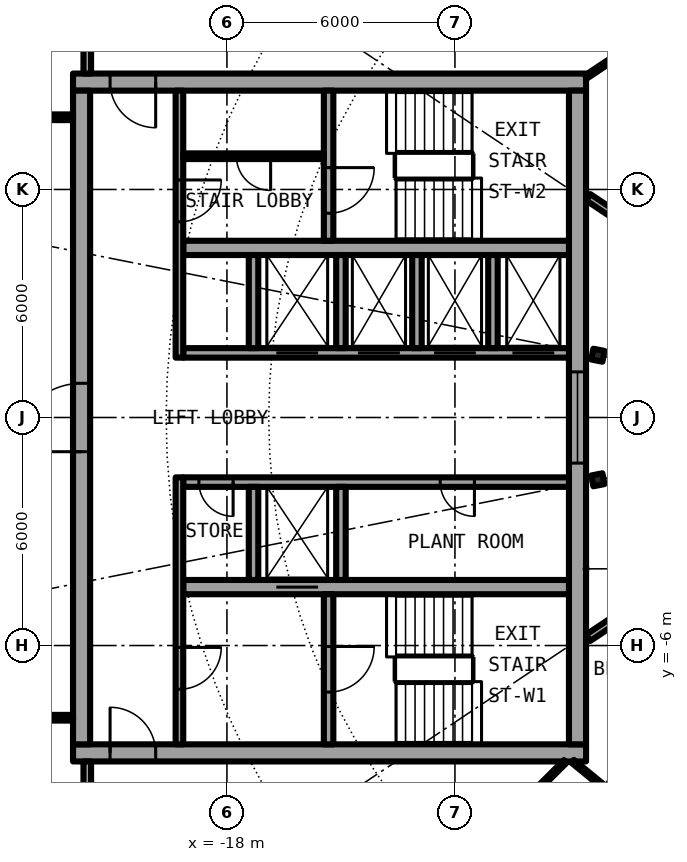
"""IFC4 building model, lengths in metres.
Left out: names, types, materials, properties, quantities, classifications, styles, units other than length and angle.
Written with IfcOpenShell. Run it as: python <this file> out.ifc"""

import sys

from ifc_helpers import new_model, si_unit, direction, frame, frame_2d, origin, origin_2d, place, context, subcontext, project, spatial, rectangle, i_section, extrude, element, fill, save


model = new_model("IFC4")
c1 = context("Model", 3, precision=1e-05, world=origin(), true_north=direction((0.0, 1.0)))
c2 = subcontext(c1, "Body", "Model", "MODEL_VIEW")
j1 = project(units=[si_unit("LENGTHUNIT", "METRE"), si_unit("PLANEANGLEUNIT", "RADIAN")], contexts=[c1])
p1 = place(None, origin())
s1 = spatial("IfcSite", under=j1, at=p1, CompositionType="ELEMENT")
p2 = place(p1, origin())
s2 = spatial("IfcBuilding", under=s1, at=p2, CompositionType="ELEMENT")
p3 = place(p2, frame((0.0, 0.0, 199.35)))
s3 = spatial("IfcBuildingStorey", under=s2, at=p3, CompositionType="ELEMENT", Elevation=199.35)
for number, where, z_axis, x_axis in (
    (1, (-8.239, 1.639, 0.0), (0.0, 0.0, 1.0), (-0.981, 0.195, 0.0)),
    (2, (-8.239, -1.639, 0.0), (0.0, 0.0, 1.0), (-0.981, -0.195, 0.0)),
):
    element("IfcColumn", number, at=place(p3, frame(where, z_axis=z_axis, x_axis=x_axis)), inside=s3, PredefinedType="COLUMN", context=c2, shape_type="SweptSolid", body=[
        extrude(i_section(OverallWidth=0.3, OverallDepth=0.29, WebThickness=0.009, FlangeThickness=0.014, FilletRadius=0.027, at=origin_2d()), origin(), (0.0, 0.0, 1.0), 3.05),
    ])
p4 = place(p3, frame((-22.05, -8.825, 0.0), z_axis=(0.0, 0.0, 1.0), x_axis=(1.0, 0.0, 0.0)))
e3 = element("IfcWall", 3, at=p4, inside=s3, PredefinedType="SHEAR", context=c2, shape_type="SweptSolid", body=[
    extrude(rectangle(XDim=13.5, YDim=0.45, at=frame_2d((6.75, 0.0))), origin(), (0.0, 0.0, 1.0), 3.05),
])
p5 = place(p4, frame((0.975, 0.0, 0.0)))
e4 = element("IfcOpeningElement", 4, at=p5, cuts=e3, PredefinedType="OPENING", context=c2, shape_type="SweptSolid", body=[
    extrude(rectangle(XDim=1.2, YDim=2.3, at=frame_2d((0.6, 1.15))), frame((0.0, 0.235, 0.0), z_axis=(0.0, -1.0, 0.0), x_axis=(1.0, 0.0, 0.0)), (0.0, 0.0, 1.0), 0.47),
])
p6 = place(p3, frame((-8.55, 8.825, 0.0), z_axis=(0.0, 0.0, 1.0), x_axis=(-1.0, 0.0, 0.0)))
e5 = element("IfcWall", 5, at=p6, inside=s3, PredefinedType="SHEAR", context=c2, shape_type="SweptSolid", body=[
    extrude(rectangle(XDim=13.5, YDim=0.45, at=frame_2d((6.75, 0.0))), origin(), (0.0, 0.0, 1.0), 3.05),
])
p7 = place(p6, frame((11.325, 0.0, 0.0)))
e6 = element("IfcOpeningElement", 6, at=p7, cuts=e5, PredefinedType="OPENING", context=c2, shape_type="SweptSolid", body=[
    extrude(rectangle(XDim=1.2, YDim=2.3, at=frame_2d((0.6, 1.15))), frame((0.0, 0.235, 0.0), z_axis=(0.0, -1.0, 0.0), x_axis=(1.0, 0.0, 0.0)), (0.0, 0.0, 1.0), 0.47),
])
p8 = place(p3, frame((-21.825, -8.6, 0.0), z_axis=(0.0, 0.0, 1.0), x_axis=(0.0, 1.0, 0.0)))
e7 = element("IfcWall", 7, at=p8, inside=s3, PredefinedType="SHEAR", context=c2, shape_type="SweptSolid", body=[
    extrude(rectangle(XDim=17.2, YDim=0.45, at=frame_2d((8.6, 0.0))), origin(), (0.0, 0.0, 1.0), 3.05),
])
p9 = place(p8, frame((7.7, 0.0, 0.0)))
e8 = element("IfcOpeningElement", 8, at=p9, cuts=e7, PredefinedType="OPENING", context=c2, shape_type="SweptSolid", body=[
    extrude(rectangle(XDim=1.8, YDim=2.3, at=frame_2d((0.9, 1.15))), frame((0.0, 0.235, 0.0), z_axis=(0.0, -1.0, 0.0), x_axis=(1.0, 0.0, 0.0)), (0.0, 0.0, 1.0), 0.47),
])
p10 = place(p3, frame((-8.775, 8.6, 0.0), z_axis=(0.0, 0.0, 1.0), x_axis=(0.0, -1.0, 0.0)))
e9 = element("IfcWall", 9, at=p10, inside=s3, PredefinedType="SHEAR", context=c2, shape_type="SweptSolid", body=[
    extrude(rectangle(XDim=17.2, YDim=0.45, at=frame_2d((8.6, 0.0))), origin(), (0.0, 0.0, 1.0), 3.05),
])
p11 = place(p10, frame((7.4, 0.0, 0.1)))
e10 = element("IfcOpeningElement", 10, at=p11, cuts=e9, PredefinedType="OPENING", context=c2, shape_type="SweptSolid", body=[
    extrude(rectangle(XDim=2.4, YDim=2.2, at=frame_2d((1.2, 1.1))), frame((0.0, 0.235, 0.0), z_axis=(0.0, -1.0, 0.0), x_axis=(1.0, 0.0, 0.0)), (0.0, 0.0, 1.0), 0.47),
])
p12 = place(p3, frame((-9.0, -1.7, 0.0), z_axis=(0.0, 0.0, 1.0), x_axis=(-1.0, 0.0, 0.0)))
e11 = element("IfcWall", 11, at=p12, inside=s3, PredefinedType="SHEAR", context=c2, shape_type="SweptSolid", body=[
    extrude(rectangle(XDim=10.15, YDim=0.25, at=frame_2d((5.075, 0.0))), origin(), (0.0, 0.0, 1.0), 3.05),
])
p13 = place(p12, frame((2.488, 0.0, 0.0)))
e12 = element("IfcOpeningElement", 12, at=p13, cuts=e11, PredefinedType="OPENING", context=c2, shape_type="SweptSolid", body=[
    extrude(rectangle(XDim=0.9, YDim=2.3, at=frame_2d((0.45, 1.15))), frame((0.0, 0.135, 0.0), z_axis=(0.0, -1.0, 0.0), x_axis=(1.0, 0.0, 0.0)), (0.0, 0.0, 1.0), 0.27),
])
p14 = place(p12, frame((8.837, 0.0, 0.0)))
e13 = element("IfcOpeningElement", 13, at=p14, cuts=e11, PredefinedType="OPENING", context=c2, shape_type="SweptSolid", body=[
    extrude(rectangle(XDim=0.9, YDim=2.3, at=frame_2d((0.45, 1.15))), frame((0.0, 0.135, 0.0), z_axis=(0.0, -1.0, 0.0), x_axis=(1.0, 0.0, 0.0)), (0.0, 0.0, 1.0), 0.27),
])
p15 = place(p3, frame((-9.0, -4.462, 0.0), z_axis=(0.0, 0.0, 1.0), x_axis=(-1.0, 0.0, 0.0)))
e14 = element("IfcWall", 14, at=p15, inside=s3, PredefinedType="SHEAR", context=c2, shape_type="SweptSolid", body=[
    extrude(rectangle(XDim=10.15, YDim=0.375, at=frame_2d((5.075, 0.0))), origin(), (0.0, 0.0, 1.0), 3.05),
])
p16 = place(p15, frame((6.6, 0.0, 0.0)))
e15 = element("IfcOpeningElement", 15, at=p16, cuts=e14, PredefinedType="OPENING", context=c2, shape_type="SweptSolid", body=[
    extrude(rectangle(XDim=1.1, YDim=2.3, at=frame_2d((0.55, 1.15))), frame((0.0, 0.198, 0.0), z_axis=(0.0, -1.0, 0.0), x_axis=(1.0, 0.0, 0.0)), (0.0, 0.0, 1.0), 0.395),
])
p17 = place(p3, frame((-15.325, -4.65, 0.0), z_axis=(0.0, 0.0, 1.0), x_axis=(0.0, -1.0, 0.0)))
e16 = element("IfcWall", 16, at=p17, inside=s3, PredefinedType="SHEAR", context=c2, shape_type="SweptSolid", body=[
    extrude(rectangle(XDim=3.95, YDim=0.25, at=frame_2d((1.975, 0.0))), origin(), (0.0, 0.0, 1.0), 3.05),
])
p18 = place(p17, frame((1.375, 0.0, 0.0)))
e17 = element("IfcOpeningElement", 17, at=p18, cuts=e16, PredefinedType="OPENING", context=c2, shape_type="SweptSolid", body=[
    extrude(rectangle(XDim=1.2, YDim=2.3, at=frame_2d((0.6, 1.15))), frame((0.0, 0.135, 0.0), z_axis=(0.0, -1.0, 0.0), x_axis=(1.0, 0.0, 0.0)), (0.0, 0.0, 1.0), 0.27),
])
for number, where, z_axis, x_axis in (
    (18, (-15.0, -1.825, 0.0), (0.0, 0.0, 1.0), (0.0, -1.0, 0.0)),
    (19, (-17.3, -1.825, 0.0), (0.0, 0.0, 1.0), (0.0, -1.0, 0.0)),
):
    element("IfcWall", number, at=place(p3, frame(where, z_axis=z_axis, x_axis=x_axis)), inside=s3, PredefinedType="SOLIDWALL", context=c2, shape_type="SweptSolid", body=[
        extrude(rectangle(XDim=2.45, YDim=0.25, at=frame_2d((1.225, 0.0))), origin(), (0.0, 0.0, 1.0), 2.7),
    ])
p19 = place(p3, frame((-19.25, -1.575, 0.0), z_axis=(0.0, 0.0, 1.0), x_axis=(0.0, -1.0, 0.0)))
e20 = element("IfcWall", 20, at=p19, inside=s3, PredefinedType="SOLIDWALL", context=c2, shape_type="SweptSolid", body=[
    extrude(rectangle(XDim=7.025, YDim=0.2, at=frame_2d((3.513, 0.0))), origin(), (0.0, 0.0, 1.0), 2.7),
])
p20 = place(p19, frame((4.475, 0.0, 0.0)))
e21 = element("IfcOpeningElement", 21, at=p20, cuts=e20, PredefinedType="OPENING", context=c2, shape_type="SweptSolid", body=[
    extrude(rectangle(XDim=1.1, YDim=2.3, at=frame_2d((0.55, 1.15))), frame((0.0, 0.11, 0.0), z_axis=(0.0, -1.0, 0.0), x_axis=(1.0, 0.0, 0.0)), (0.0, 0.0, 1.0), 0.22),
])
p21 = place(p3, frame((-9.0, 1.7, 0.0), z_axis=(0.0, 0.0, 1.0), x_axis=(-1.0, 0.0, 0.0)))
e22 = element("IfcWall", 22, at=p21, inside=s3, PredefinedType="SHEAR", context=c2, shape_type="SweptSolid", body=[
    extrude(rectangle(XDim=10.15, YDim=0.25, at=frame_2d((5.075, 0.0))), origin(), (0.0, 0.0, 1.0), 3.05),
])
p22 = place(p21, frame((0.387, 0.0, 0.0)))
e23 = element("IfcOpeningElement", 23, at=p22, cuts=e22, PredefinedType="OPENING", context=c2, shape_type="SweptSolid", body=[
    extrude(rectangle(XDim=1.1, YDim=2.3, at=frame_2d((0.55, 1.15))), frame((0.0, 0.135, 0.0), z_axis=(0.0, -1.0, 0.0), x_axis=(1.0, 0.0, 0.0)), (0.0, 0.0, 1.0), 0.27),
])
p23 = place(p21, frame((2.45, 0.0, 0.0)))
e24 = element("IfcOpeningElement", 24, at=p23, cuts=e22, PredefinedType="OPENING", context=c2, shape_type="SweptSolid", body=[
    extrude(rectangle(XDim=1.1, YDim=2.3, at=frame_2d((0.55, 1.15))), frame((0.0, 0.135, 0.0), z_axis=(0.0, -1.0, 0.0), x_axis=(1.0, 0.0, 0.0)), (0.0, 0.0, 1.0), 0.27),
])
p24 = place(p21, frame((4.45, 0.0, 0.0)))
e25 = element("IfcOpeningElement", 25, at=p24, cuts=e22, PredefinedType="OPENING", context=c2, shape_type="SweptSolid", body=[
    extrude(rectangle(XDim=1.1, YDim=2.3, at=frame_2d((0.55, 1.15))), frame((0.0, 0.135, 0.0), z_axis=(0.0, -1.0, 0.0), x_axis=(1.0, 0.0, 0.0)), (0.0, 0.0, 1.0), 0.27),
])
p25 = place(p21, frame((6.6, 0.0, 0.0)))
e26 = element("IfcOpeningElement", 26, at=p25, cuts=e22, PredefinedType="OPENING", context=c2, shape_type="SweptSolid", body=[
    extrude(rectangle(XDim=1.1, YDim=2.3, at=frame_2d((0.55, 1.15))), frame((0.0, 0.135, 0.0), z_axis=(0.0, -1.0, 0.0), x_axis=(1.0, 0.0, 0.0)), (0.0, 0.0, 1.0), 0.27),
])
p26 = place(p3, frame((-9.0, 4.462, 0.0), z_axis=(0.0, 0.0, 1.0), x_axis=(-1.0, 0.0, 0.0)))
e27 = element("IfcWall", 27, at=p26, inside=s3, PredefinedType="SHEAR", context=c2, shape_type="SweptSolid", body=[
    extrude(rectangle(XDim=10.15, YDim=0.375, at=frame_2d((5.075, 0.0))), origin(), (0.0, 0.0, 1.0), 3.05),
])
p27 = place(p3, frame((-15.325, 8.6, 0.0), z_axis=(0.0, 0.0, 1.0), x_axis=(0.0, -1.0, 0.0)))
e28 = element("IfcWall", 28, at=p27, inside=s3, PredefinedType="SHEAR", context=c2, shape_type="SweptSolid", body=[
    extrude(rectangle(XDim=3.95, YDim=0.25, at=frame_2d((1.975, 0.0))), origin(), (0.0, 0.0, 1.0), 3.05),
])
p28 = place(p27, frame((2.025, 0.0, 0.0)))
e29 = element("IfcOpeningElement", 29, at=p28, cuts=e28, PredefinedType="OPENING", context=c2, shape_type="SweptSolid", body=[
    extrude(rectangle(XDim=1.2, YDim=2.3, at=frame_2d((0.6, 1.15))), frame((0.0, 0.135, 0.0), z_axis=(0.0, -1.0, 0.0), x_axis=(1.0, 0.0, 0.0)), (0.0, 0.0, 1.0), 0.27),
])
for number, where, z_axis, x_axis in (
    (30, (-15.0, 1.825, 0.0), (0.0, 0.0, 1.0), (0.0, 1.0, 0.0)),
    (31, (-17.3, 1.825, 0.0), (0.0, 0.0, 1.0), (0.0, 1.0, 0.0)),
):
    element("IfcWall", number, at=place(p3, frame(where, z_axis=z_axis, x_axis=x_axis)), inside=s3, PredefinedType="SOLIDWALL", context=c2, shape_type="SweptSolid", body=[
        extrude(rectangle(XDim=2.45, YDim=0.25, at=frame_2d((1.225, 0.0))), origin(), (0.0, 0.0, 1.0), 2.7),
    ])
p29 = place(p3, frame((-19.25, 8.6, 0.0), z_axis=(0.0, 0.0, 1.0), x_axis=(0.0, -1.0, 0.0)))
e32 = element("IfcWall", 32, at=p29, inside=s3, PredefinedType="SOLIDWALL", context=c2, shape_type="SweptSolid", body=[
    extrude(rectangle(XDim=7.025, YDim=0.2, at=frame_2d((3.513, 0.0))), origin(), (0.0, 0.0, 1.0), 2.7),
])
p30 = place(p29, frame((2.35, 0.0, 0.0)))
e33 = element("IfcOpeningElement", 33, at=p30, cuts=e32, PredefinedType="OPENING", context=c2, shape_type="SweptSolid", body=[
    extrude(rectangle(XDim=1.1, YDim=2.3, at=frame_2d((0.55, 1.15))), frame((0.0, 0.11, 0.0), z_axis=(0.0, -1.0, 0.0), x_axis=(1.0, 0.0, 0.0)), (0.0, 0.0, 1.0), 0.22),
])
for number, where, z_axis, x_axis in (
    (34, (-11.0, 1.825, 0.0), (0.0, 0.0, 1.0), (0.0, 1.0, 0.0)),
    (35, (-13.0, 1.825, 0.0), (0.0, 0.0, 1.0), (0.0, 1.0, 0.0)),
):
    element("IfcWall", number, at=place(p3, frame(where, z_axis=z_axis, x_axis=x_axis)), inside=s3, PredefinedType="SOLIDWALL", context=c2, shape_type="SweptSolid", body=[
        extrude(rectangle(XDim=2.45, YDim=0.25, at=frame_2d((1.225, 0.0))), origin(), (0.0, 0.0, 1.0), 2.7),
    ])
p31 = place(p3, frame((-15.45, 6.875, 0.0), z_axis=(0.0, 0.0, 1.0), x_axis=(-1.0, 0.0, 0.0)))
e36 = element("IfcWall", 36, at=p31, inside=s3, PredefinedType="PARTITIONING", context=c2, shape_type="SweptSolid", body=[
    extrude(rectangle(XDim=3.7, YDim=0.15, at=frame_2d((1.85, 0.0))), origin(), (0.0, 0.0, 1.0), 2.7),
])
p32 = place(p31, frame((1.4, 0.0, 0.0)))
e37 = element("IfcOpeningElement", 37, at=p32, cuts=e36, PredefinedType="OPENING", context=c2, shape_type="SweptSolid", body=[
    extrude(rectangle(XDim=0.9, YDim=2.3, at=frame_2d((0.45, 1.15))), frame((0.0, 0.085, 0.0), z_axis=(0.0, -1.0, 0.0), x_axis=(1.0, 0.0, 0.0)), (0.0, 0.0, 1.0), 0.17),
])
for number, where, z_axis, x_axis in (
    (38, (-22.05, 7.9, 0.0), (0.0, 0.0, 1.0), (-1.0, 0.0, 0.0)),
    (39, (-22.05, -7.9, 0.0), (0.0, 0.0, 1.0), (-1.0, 0.0, 0.0)),
):
    element("IfcWall", number, at=place(p3, frame(where, z_axis=z_axis, x_axis=x_axis)), inside=s3, PredefinedType="PARTITIONING", context=c2, shape_type="SweptSolid", body=[
        extrude(rectangle(XDim=2.89, YDim=0.15, at=frame_2d((1.445, 0.0))), origin(), (0.0, 0.0, 1.0), 2.7),
    ])
p33 = place(p3, frame((-8.901, -9.047, 0.0), z_axis=(0.0, 0.0, 1.0), x_axis=(0.772786083133, -0.634666581534, 0.0)))
e40 = element("IfcWall", 40, at=p33, inside=s3, PredefinedType="PARTITIONING", context=c2, shape_type="SweptSolid", body=[
    extrude(rectangle(XDim=1.144, YDim=0.1, at=frame_2d((0.572, 0.0))), origin(), (0.0, 0.0, 1.0), 2.7),
])
p34 = place(p3, frame((-6.513, -4.472, 0.0), z_axis=(0.0, 0.0, 1.0), x_axis=(-0.831403409976, -0.555669299026, 0.0)))
e41 = element("IfcWall", 41, at=p34, inside=s3, PredefinedType="PARTITIONING", context=c2, shape_type="SweptSolid", body=[
    extrude(rectangle(XDim=2.383, YDim=0.2, at=frame_2d((1.191, 0.0))), origin(), (0.0, 0.0, 1.0), 2.7),
])
p35 = place(p3, frame((-12.069, -12.007, 0.0), z_axis=(0.0, 0.0, 1.0), x_axis=(0.708909651863, 0.705299302067, 0.0)))
e42 = element("IfcWall", 42, at=p35, inside=s3, PredefinedType="PARTITIONING", context=c2, shape_type="SweptSolid", body=[
    extrude(rectangle(XDim=4.193, YDim=0.1, at=frame_2d((2.096, 0.0))), origin(), (0.0, 0.0, 1.0), 2.7),
])
p36 = place(p35, frame((1.646, 0.0, 0.0)))
e43 = element("IfcOpeningElement", 43, at=p36, cuts=e42, PredefinedType="OPENING", context=c2, shape_type="SweptSolid", body=[
    extrude(rectangle(XDim=0.9, YDim=2.3, at=frame_2d((0.45, 1.15))), frame((0.0, 0.06, 0.0), z_axis=(0.0, -1.0, 0.0), x_axis=(1.0, 0.0, 0.0)), (0.0, 0.0, 1.0), 0.12),
])
p37 = place(p3, frame((-8.019, -9.771, 0.0), z_axis=(0.0, 0.0, 1.0), x_axis=(0.634401778971, 0.773003481776, 0.0)))
e44 = element("IfcWall", 44, at=p37, inside=s3, PredefinedType="PARTITIONING", context=c2, shape_type="SweptSolid", body=[
    extrude(rectangle(XDim=4.92, YDim=0.1, at=frame_2d((2.46, 0.0))), origin(), (0.0, 0.0, 1.0), 2.7),
])
p38 = place(p37, frame((2.01, 0.0, 0.0)))
e45 = element("IfcOpeningElement", 45, at=p38, cuts=e44, PredefinedType="OPENING", context=c2, shape_type="SweptSolid", body=[
    extrude(rectangle(XDim=0.9, YDim=2.3, at=frame_2d((0.45, 1.15))), frame((0.0, 0.06, 0.0), z_axis=(0.0, -1.0, 0.0), x_axis=(1.0, 0.0, 0.0)), (0.0, 0.0, 1.0), 0.12),
])
p39 = place(p3, frame((-6.513, 4.472, 0.0), z_axis=(0.0, 0.0, 1.0), x_axis=(-0.831403409976, 0.555669299026, 0.0)))
e46 = element("IfcWall", 46, at=p39, inside=s3, PredefinedType="PARTITIONING", context=c2, shape_type="SweptSolid", body=[
    extrude(rectangle(XDim=2.383, YDim=0.2, at=frame_2d((1.191, 0.0))), origin(), (0.0, 0.0, 1.0), 2.7),
])
p40 = place(p3, frame((-8.55, 8.963, 0.0), z_axis=(0.0, 0.0, 1.0), x_axis=(0.83129689803, 0.555828631257, 0.0)))
e47 = element("IfcWall", 47, at=p40, inside=s3, PredefinedType="PARTITIONING", context=c2, shape_type="SweptSolid", body=[
    extrude(rectangle(XDim=3.394, YDim=0.1, at=frame_2d((1.697, 0.0))), origin(), (0.0, 0.0, 1.0), 2.7),
])
for number, where, z_axis, x_axis in (
    (48, (-21.675, -10.825, 0.0), (0.0, 0.0, 1.0), (0.0, 1.0, 0.0)),
    (49, (-21.675, 9.05, 0.0), (0.0, 0.0, 1.0), (0.0, 1.0, 0.0)),
):
    element("IfcWall", number, at=place(p3, frame(where, z_axis=z_axis, x_axis=x_axis)), inside=s3, PredefinedType="PARTITIONING", context=c2, shape_type="SweptSolid", body=[
        extrude(rectangle(XDim=1.775, YDim=0.2, at=frame_2d((0.887, 0.0))), origin(), (0.0, 0.0, 1.0), 2.7),
    ])
p41 = place(p16, origin())
e50 = element("IfcDoor", 50, at=p41, inside=s3, OperationType="DOUBLE_DOOR_SLIDING", PredefinedType="DOOR", context=c2, shape_type="SweptSolid", body=[
    extrude(rectangle(XDim=1.1, YDim=2.3, at=frame_2d((0.55, 1.15))), frame((0.0, 0.025, 0.0), z_axis=(0.0, -1.0, 0.0), x_axis=(1.0, 0.0, 0.0)), (0.0, 0.0, 1.0), 0.05),
])
fill(e15, e50)
p42 = place(p22, origin())
e51 = element("IfcDoor", 51, at=p42, inside=s3, OperationType="DOUBLE_DOOR_SLIDING", PredefinedType="DOOR", context=c2, shape_type="SweptSolid", body=[
    extrude(rectangle(XDim=1.1, YDim=2.3, at=frame_2d((0.55, 1.15))), frame((0.0, 0.025, 0.0), z_axis=(0.0, -1.0, 0.0), x_axis=(1.0, 0.0, 0.0)), (0.0, 0.0, 1.0), 0.05),
])
fill(e23, e51)
p43 = place(p23, origin())
e52 = element("IfcDoor", 52, at=p43, inside=s3, OperationType="DOUBLE_DOOR_SLIDING", PredefinedType="DOOR", context=c2, shape_type="SweptSolid", body=[
    extrude(rectangle(XDim=1.1, YDim=2.3, at=frame_2d((0.55, 1.15))), frame((0.0, 0.025, 0.0), z_axis=(0.0, -1.0, 0.0), x_axis=(1.0, 0.0, 0.0)), (0.0, 0.0, 1.0), 0.05),
])
fill(e24, e52)
p44 = place(p24, origin())
e53 = element("IfcDoor", 53, at=p44, inside=s3, OperationType="DOUBLE_DOOR_SLIDING", PredefinedType="DOOR", context=c2, shape_type="SweptSolid", body=[
    extrude(rectangle(XDim=1.1, YDim=2.3, at=frame_2d((0.55, 1.15))), frame((0.0, 0.025, 0.0), z_axis=(0.0, -1.0, 0.0), x_axis=(1.0, 0.0, 0.0)), (0.0, 0.0, 1.0), 0.05),
])
fill(e25, e53)
p45 = place(p25, origin())
e54 = element("IfcDoor", 54, at=p45, inside=s3, OperationType="DOUBLE_DOOR_SLIDING", PredefinedType="DOOR", context=c2, shape_type="SweptSolid", body=[
    extrude(rectangle(XDim=1.1, YDim=2.3, at=frame_2d((0.55, 1.15))), frame((0.0, 0.025, 0.0), z_axis=(0.0, -1.0, 0.0), x_axis=(1.0, 0.0, 0.0)), (0.0, 0.0, 1.0), 0.05),
])
fill(e26, e54)
p46 = place(p13, origin())
e55 = element("IfcDoor", 55, at=p46, inside=s3, OperationType="SINGLE_SWING_RIGHT", PredefinedType="DOOR", context=c2, shape_type="SweptSolid", body=[
    extrude(rectangle(XDim=0.9, YDim=2.3, at=frame_2d((0.45, 1.15))), frame((0.0, 0.025, 0.0), z_axis=(0.0, -1.0, 0.0), x_axis=(1.0, 0.0, 0.0)), (0.0, 0.0, 1.0), 0.05),
])
fill(e12, e55)
p47 = place(p14, origin())
e56 = element("IfcDoor", 56, at=p47, inside=s3, OperationType="SINGLE_SWING_LEFT", PredefinedType="DOOR", context=c2, shape_type="SweptSolid", body=[
    extrude(rectangle(XDim=0.9, YDim=2.3, at=frame_2d((0.45, 1.15))), frame((0.0, 0.025, 0.0), z_axis=(0.0, -1.0, 0.0), x_axis=(1.0, 0.0, 0.0)), (0.0, 0.0, 1.0), 0.05),
])
fill(e13, e56)
p48 = place(p32, origin())
e57 = element("IfcDoor", 57, at=p48, inside=s3, OperationType="SINGLE_SWING_LEFT", PredefinedType="DOOR", context=c2, shape_type="SweptSolid", body=[
    extrude(rectangle(XDim=0.9, YDim=2.3, at=frame_2d((0.45, 1.15))), frame((0.0, 0.025, 0.0), z_axis=(0.0, -1.0, 0.0), x_axis=(1.0, 0.0, 0.0)), (0.0, 0.0, 1.0), 0.05),
])
fill(e37, e57)
p49 = place(p18, origin())
e58 = element("IfcDoor", 58, at=p49, inside=s3, OperationType="SINGLE_SWING_LEFT", PredefinedType="DOOR", context=c2, shape_type="SweptSolid", body=[
    extrude(rectangle(XDim=1.2, YDim=2.3, at=frame_2d((0.6, 1.15))), frame((0.0, 0.025, 0.0), z_axis=(0.0, -1.0, 0.0), x_axis=(1.0, 0.0, 0.0)), (0.0, 0.0, 1.0), 0.05),
])
fill(e17, e58)
p50 = place(p28, origin())
e59 = element("IfcDoor", 59, at=p50, inside=s3, OperationType="SINGLE_SWING_LEFT", PredefinedType="DOOR", context=c2, shape_type="SweptSolid", body=[
    extrude(rectangle(XDim=1.2, YDim=2.3, at=frame_2d((0.6, 1.15))), frame((0.0, 0.025, 0.0), z_axis=(0.0, -1.0, 0.0), x_axis=(1.0, 0.0, 0.0)), (0.0, 0.0, 1.0), 0.05),
])
fill(e29, e59)
p51 = place(p20, origin())
e60 = element("IfcDoor", 60, at=p51, inside=s3, OperationType="SINGLE_SWING_LEFT", PredefinedType="DOOR", context=c2, shape_type="SweptSolid", body=[
    extrude(rectangle(XDim=1.1, YDim=2.3, at=frame_2d((0.55, 1.15))), frame((0.0, 0.025, 0.0), z_axis=(0.0, -1.0, 0.0), x_axis=(1.0, 0.0, 0.0)), (0.0, 0.0, 1.0), 0.05),
])
fill(e21, e60)
p52 = place(p30, origin())
e61 = element("IfcDoor", 61, at=p52, inside=s3, OperationType="SINGLE_SWING_RIGHT", PredefinedType="DOOR", context=c2, shape_type="SweptSolid", body=[
    extrude(rectangle(XDim=1.1, YDim=2.3, at=frame_2d((0.55, 1.15))), frame((0.0, 0.025, 0.0), z_axis=(0.0, -1.0, 0.0), x_axis=(1.0, 0.0, 0.0)), (0.0, 0.0, 1.0), 0.05),
])
fill(e33, e61)
p53 = place(p5, origin())
e62 = element("IfcDoor", 62, at=p53, inside=s3, OperationType="SINGLE_SWING_RIGHT", PredefinedType="DOOR", context=c2, shape_type="SweptSolid", body=[
    extrude(rectangle(XDim=1.2, YDim=2.3, at=frame_2d((0.6, 1.15))), frame((0.0, 0.025, 0.0), z_axis=(0.0, -1.0, 0.0), x_axis=(1.0, 0.0, 0.0)), (0.0, 0.0, 1.0), 0.05),
])
fill(e4, e62)
p54 = place(p7, origin())
e63 = element("IfcDoor", 63, at=p54, inside=s3, OperationType="SINGLE_SWING_LEFT", PredefinedType="DOOR", context=c2, shape_type="SweptSolid", body=[
    extrude(rectangle(XDim=1.2, YDim=2.3, at=frame_2d((0.6, 1.15))), frame((0.0, 0.025, 0.0), z_axis=(0.0, -1.0, 0.0), x_axis=(1.0, 0.0, 0.0)), (0.0, 0.0, 1.0), 0.05),
])
fill(e6, e63)
p55 = place(p9, origin())
e64 = element("IfcDoor", 64, at=p55, inside=s3, OperationType="SINGLE_SWING_LEFT", PredefinedType="DOOR", context=c2, shape_type="SweptSolid", body=[
    extrude(rectangle(XDim=1.8, YDim=2.3, at=frame_2d((0.9, 1.15))), frame((0.0, 0.025, 0.0), z_axis=(0.0, -1.0, 0.0), x_axis=(1.0, 0.0, 0.0)), (0.0, 0.0, 1.0), 0.05),
])
fill(e8, e64)
p56 = place(p11, origin())
e65 = element("IfcWindow", 65, at=p56, inside=s3, PartitioningType="SINGLE_PANEL", PredefinedType="WINDOW", context=c2, shape_type="SweptSolid", body=[
    extrude(rectangle(XDim=2.4, YDim=2.2, at=frame_2d((1.2, 1.1))), frame((0.0, 0.03, 0.0), z_axis=(0.0, -1.0, 0.0), x_axis=(1.0, 0.0, 0.0)), (0.0, 0.0, 1.0), 0.06),
])
fill(e10, e65)
save(model, sys.argv[1])
